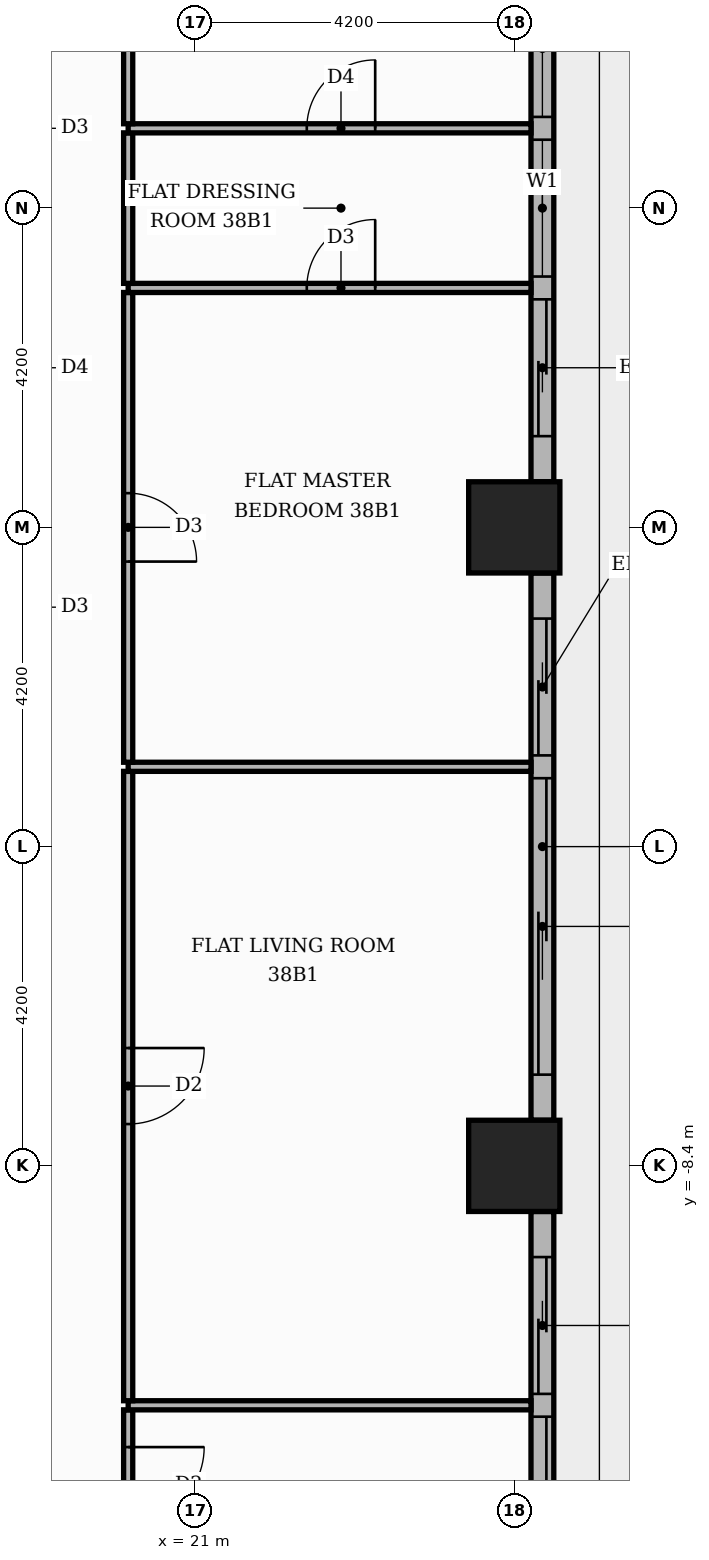
"""IFC4 building model, lengths in metres.
Left out: names, types, materials, properties, quantities, classifications, styles, units other than length and angle.
Written with IfcOpenShell. Run it as: python <this file> out.ifc"""

import sys

from ifc_helpers import new_model, si_unit, direction, frame, frame_2d, origin, origin_2d, place, context, subcontext, project, spatial, rectangle, extrude, element, fill, save


model = new_model("IFC4")
c1 = context("Model", 3, precision=1e-05, world=origin(), true_north=direction((0.0, 1.0)))
c2 = subcontext(c1, "Body", "Model", "MODEL_VIEW")
j1 = project(units=[si_unit("LENGTHUNIT", "METRE"), si_unit("PLANEANGLEUNIT", "RADIAN")], contexts=[c1])
p1 = place(None, origin())
s1 = spatial("IfcSite", under=j1, at=p1, CompositionType="ELEMENT")
p2 = place(p1, origin())
s2 = spatial("IfcBuilding", under=s1, at=p2, CompositionType="ELEMENT")
p3 = place(p2, frame((0.0, 0.0, 161.1)))
s3 = spatial("IfcBuildingStorey", under=s2, at=p3, CompositionType="ELEMENT", Elevation=161.1)
for number, where, z_axis, x_axis in (
    (1, (25.2, 0.0, 0.0), (0.0, 0.0, 1.0), (1.0, 0.0, 0.0)),
    (2, (25.2, -8.4, 0.0), (0.0, 0.0, 1.0), (1.0, 0.0, 0.0)),
):
    element("IfcColumn", number, at=place(p3, frame(where, z_axis=z_axis, x_axis=x_axis)), inside=s3, PredefinedType="COLUMN", context=c2, shape_type="SweptSolid", body=[
        extrude(rectangle(XDim=1.2, YDim=1.2, at=origin_2d()), origin(), (0.0, 0.0, 1.0), 3.9),
    ])
p4 = place(p3, frame((25.57, -16.2, 0.0), z_axis=(0.0, 0.0, 1.0), x_axis=(0.0, 1.0, 0.0)))
e3 = element("IfcWall", 3, at=p4, inside=s3, PredefinedType="STANDARD", context=c2, shape_type="SweptSolid", body=[
    extrude(rectangle(XDim=7.2, YDim=0.3, at=frame_2d((3.6, 0.0))), origin(), (0.0, 0.0, 1.0), 3.48),
])
p5 = place(p4, frame((0.6, 0.0, 0.0)))
e4 = element("IfcOpeningElement", 4, at=p5, cuts=e3, PredefinedType="OPENING", context=c2, shape_type="SweptSolid", body=[
    extrude(rectangle(XDim=3.9, YDim=2.4, at=frame_2d((1.95, 1.2))), frame((0.0, 0.16, 0.0), z_axis=(0.0, -1.0, 0.0), x_axis=(1.0, 0.0, 0.0)), (0.0, 0.0, 1.0), 0.32),
])
p6 = place(p4, frame((4.8, 0.0, 0.0)))
e5 = element("IfcOpeningElement", 5, at=p6, cuts=e3, PredefinedType="OPENING", context=c2, shape_type="SweptSolid", body=[
    extrude(rectangle(XDim=1.8, YDim=2.4, at=frame_2d((0.9, 1.2))), frame((0.0, 0.16, 0.0), z_axis=(0.0, -1.0, 0.0), x_axis=(1.0, 0.0, 0.0)), (0.0, 0.0, 1.0), 0.32),
])
p7 = place(p3, frame((25.57, -7.8, 0.0), z_axis=(0.0, 0.0, 1.0), x_axis=(0.0, 1.0, 0.0)))
e6 = element("IfcWall", 6, at=p7, inside=s3, PredefinedType="STANDARD", context=c2, shape_type="SweptSolid", body=[
    extrude(rectangle(XDim=7.2, YDim=0.3, at=frame_2d((3.6, 0.0))), origin(), (0.0, 0.0, 1.0), 3.48),
])
p8 = place(p7, frame((0.6, 0.0, 0.0)))
e7 = element("IfcOpeningElement", 7, at=p8, cuts=e6, PredefinedType="OPENING", context=c2, shape_type="SweptSolid", body=[
    extrude(rectangle(XDim=3.9, YDim=2.4, at=frame_2d((1.95, 1.2))), frame((0.0, 0.16, 0.0), z_axis=(0.0, -1.0, 0.0), x_axis=(1.0, 0.0, 0.0)), (0.0, 0.0, 1.0), 0.32),
])
p9 = place(p7, frame((4.8, 0.0, 0.0)))
e8 = element("IfcOpeningElement", 8, at=p9, cuts=e6, PredefinedType="OPENING", context=c2, shape_type="SweptSolid", body=[
    extrude(rectangle(XDim=1.8, YDim=2.4, at=frame_2d((0.9, 1.2))), frame((0.0, 0.16, 0.0), z_axis=(0.0, -1.0, 0.0), x_axis=(1.0, 0.0, 0.0)), (0.0, 0.0, 1.0), 0.32),
])
p10 = place(p3, frame((25.57, 0.6, 0.0), z_axis=(0.0, 0.0, 1.0), x_axis=(0.0, 1.0, 0.0)))
e9 = element("IfcWall", 9, at=p10, inside=s3, PredefinedType="STANDARD", context=c2, shape_type="SweptSolid", body=[
    extrude(rectangle(XDim=7.2, YDim=0.3, at=frame_2d((3.6, 0.0))), origin(), (0.0, 0.0, 1.0), 3.48),
])
p11 = place(p10, frame((0.6, 0.0, 0.0)))
e10 = element("IfcOpeningElement", 10, at=p11, cuts=e9, PredefinedType="OPENING", context=c2, shape_type="SweptSolid", body=[
    extrude(rectangle(XDim=1.8, YDim=2.4, at=frame_2d((0.9, 1.2))), frame((0.0, 0.16, 0.0), z_axis=(0.0, -1.0, 0.0), x_axis=(1.0, 0.0, 0.0)), (0.0, 0.0, 1.0), 0.32),
])
p12 = place(p10, frame((2.7, 0.0, 0.9)))
e11 = element("IfcOpeningElement", 11, at=p12, cuts=e9, PredefinedType="OPENING", context=c2, shape_type="SweptSolid", body=[
    extrude(rectangle(XDim=1.8, YDim=2.1, at=frame_2d((0.9, 1.05))), frame((0.0, 0.16, 0.0), z_axis=(0.0, -1.0, 0.0), x_axis=(1.0, 0.0, 0.0)), (0.0, 0.0, 1.0), 0.32),
])
p13 = place(p10, frame((4.8, 0.0, 0.9)))
e12 = element("IfcOpeningElement", 12, at=p13, cuts=e9, PredefinedType="OPENING", context=c2, shape_type="SweptSolid", body=[
    extrude(rectangle(XDim=1.8, YDim=2.1, at=frame_2d((0.9, 1.05))), frame((0.0, 0.16, 0.0), z_axis=(0.0, -1.0, 0.0), x_axis=(1.0, 0.0, 0.0)), (0.0, 0.0, 1.0), 0.32),
])
p14 = place(p3, frame((20.12, -13.59, 0.0), z_axis=(0.0, 0.0, 1.0), x_axis=(0.0, 1.0, 0.0)))
e13 = element("IfcWall", 13, at=p14, inside=s3, PredefinedType="PARTITIONING", context=c2, shape_type="SweptSolid", body=[
    extrude(rectangle(XDim=1.98, YDim=0.12, at=frame_2d((0.99, 0.0))), origin(), (0.0, 0.0, 1.0), 3.48),
])
p15 = place(p14, frame((0.49, 0.0, 0.0)))
e14 = element("IfcOpeningElement", 14, at=p15, cuts=e13, PredefinedType="OPENING", context=c2, shape_type="SweptSolid", body=[
    extrude(rectangle(XDim=1.0, YDim=2.1, at=frame_2d((0.5, 1.05))), frame((0.0, 0.07, 0.0), z_axis=(0.0, -1.0, 0.0), x_axis=(1.0, 0.0, 0.0)), (0.0, 0.0, 1.0), 0.14),
])
p16 = place(p3, frame((20.12, -11.55, 0.0), z_axis=(0.0, 0.0, 1.0), x_axis=(1.0, 0.0, 0.0)))
e15 = element("IfcWall", 15, at=p16, inside=s3, PredefinedType="PARTITIONING", context=c2, shape_type="SweptSolid", body=[
    extrude(rectangle(XDim=5.3, YDim=0.12, at=frame_2d((2.65, 0.0))), origin(), (0.0, 0.0, 1.0), 3.48),
])
p17 = place(p3, frame((20.12, -11.49, 0.0), z_axis=(0.0, 0.0, 1.0), x_axis=(0.0, 1.0, 0.0)))
e16 = element("IfcWall", 16, at=p17, inside=s3, PredefinedType="PARTITIONING", context=c2, shape_type="SweptSolid", body=[
    extrude(rectangle(XDim=8.28, YDim=0.12, at=frame_2d((4.14, 0.0))), origin(), (0.0, 0.0, 1.0), 3.48),
])
p18 = place(p17, frame((3.64, 0.0, 0.0)))
e17 = element("IfcOpeningElement", 17, at=p18, cuts=e16, PredefinedType="OPENING", context=c2, shape_type="SweptSolid", body=[
    extrude(rectangle(XDim=1.0, YDim=2.1, at=frame_2d((0.5, 1.05))), frame((0.0, 0.07, 0.0), z_axis=(0.0, -1.0, 0.0), x_axis=(1.0, 0.0, 0.0)), (0.0, 0.0, 1.0), 0.14),
])
p19 = place(p3, frame((20.12, -3.15, 0.0), z_axis=(0.0, 0.0, 1.0), x_axis=(1.0, 0.0, 0.0)))
e18 = element("IfcWall", 18, at=p19, inside=s3, PredefinedType="PARTITIONING", context=c2, shape_type="SweptSolid", body=[
    extrude(rectangle(XDim=5.3, YDim=0.12, at=frame_2d((2.65, 0.0))), origin(), (0.0, 0.0, 1.0), 3.48),
])
p20 = place(p3, frame((20.12, -3.09, 0.0), z_axis=(0.0, 0.0, 1.0), x_axis=(0.0, 1.0, 0.0)))
e19 = element("IfcWall", 19, at=p20, inside=s3, PredefinedType="PARTITIONING", context=c2, shape_type="SweptSolid", body=[
    extrude(rectangle(XDim=6.18, YDim=0.12, at=frame_2d((3.09, 0.0))), origin(), (0.0, 0.0, 1.0), 3.48),
])
p21 = place(p20, frame((2.64, 0.0, 0.0)))
e20 = element("IfcOpeningElement", 20, at=p21, cuts=e19, PredefinedType="OPENING", context=c2, shape_type="SweptSolid", body=[
    extrude(rectangle(XDim=0.9, YDim=2.1, at=frame_2d((0.45, 1.05))), frame((0.0, 0.07, 0.0), z_axis=(0.0, -1.0, 0.0), x_axis=(1.0, 0.0, 0.0)), (0.0, 0.0, 1.0), 0.14),
])
p22 = place(p3, frame((20.12, 3.15, 0.0), z_axis=(0.0, 0.0, 1.0), x_axis=(1.0, 0.0, 0.0)))
e21 = element("IfcWall", 21, at=p22, inside=s3, PredefinedType="PARTITIONING", context=c2, shape_type="SweptSolid", body=[
    extrude(rectangle(XDim=5.3, YDim=0.12, at=frame_2d((2.65, 0.0))), origin(), (0.0, 0.0, 1.0), 3.48),
])
p23 = place(p22, frame((2.35, 0.0, 0.0)))
e22 = element("IfcOpeningElement", 22, at=p23, cuts=e21, PredefinedType="OPENING", context=c2, shape_type="SweptSolid", body=[
    extrude(rectangle(XDim=0.9, YDim=2.1, at=frame_2d((0.45, 1.05))), frame((0.0, 0.07, 0.0), z_axis=(0.0, -1.0, 0.0), x_axis=(1.0, 0.0, 0.0)), (0.0, 0.0, 1.0), 0.14),
])
p24 = place(p3, frame((20.12, 3.21, 0.0), z_axis=(0.0, 0.0, 1.0), x_axis=(0.0, 1.0, 0.0)))
e23 = element("IfcWall", 23, at=p24, inside=s3, PredefinedType="PARTITIONING", context=c2, shape_type="SweptSolid", body=[
    extrude(rectangle(XDim=1.98, YDim=0.12, at=frame_2d((0.99, 0.0))), origin(), (0.0, 0.0, 1.0), 3.48),
])
p25 = place(p3, frame((20.12, 5.25, 0.0), z_axis=(0.0, 0.0, 1.0), x_axis=(1.0, 0.0, 0.0)))
e24 = element("IfcWall", 24, at=p25, inside=s3, PredefinedType="PARTITIONING", context=c2, shape_type="SweptSolid", body=[
    extrude(rectangle(XDim=5.3, YDim=0.12, at=frame_2d((2.65, 0.0))), origin(), (0.0, 0.0, 1.0), 3.48),
])
p26 = place(p25, frame((2.35, 0.0, 0.0)))
e25 = element("IfcOpeningElement", 25, at=p26, cuts=e24, PredefinedType="OPENING", context=c2, shape_type="SweptSolid", body=[
    extrude(rectangle(XDim=0.9, YDim=2.1, at=frame_2d((0.45, 1.05))), frame((0.0, 0.07, 0.0), z_axis=(0.0, -1.0, 0.0), x_axis=(1.0, 0.0, 0.0)), (0.0, 0.0, 1.0), 0.14),
])
p27 = place(p3, frame((20.12, 5.31, 0.0), z_axis=(0.0, 0.0, 1.0), x_axis=(0.0, 1.0, 0.0)))
e26 = element("IfcWall", 26, at=p27, inside=s3, PredefinedType="PARTITIONING", context=c2, shape_type="SweptSolid", body=[
    extrude(rectangle(XDim=1.98, YDim=0.12, at=frame_2d((0.99, 0.0))), origin(), (0.0, 0.0, 1.0), 3.48),
])
p28 = place(p5, origin())
e27 = element("IfcDoor", 27, at=p28, inside=s3, OperationType="SLIDING_TO_LEFT", PredefinedType="DOOR", context=c2, shape_type="SweptSolid", body=[
    extrude(rectangle(XDim=3.9, YDim=2.4, at=frame_2d((1.95, 1.2))), frame((0.0, 0.025, 0.0), z_axis=(0.0, -1.0, 0.0), x_axis=(1.0, 0.0, 0.0)), (0.0, 0.0, 1.0), 0.05),
])
fill(e4, e27)
p29 = place(p6, origin())
e28 = element("IfcDoor", 28, at=p29, inside=s3, OperationType="SLIDING_TO_RIGHT", PredefinedType="DOOR", context=c2, shape_type="SweptSolid", body=[
    extrude(rectangle(XDim=1.8, YDim=2.4, at=frame_2d((0.9, 1.2))), frame((0.0, 0.025, 0.0), z_axis=(0.0, -1.0, 0.0), x_axis=(1.0, 0.0, 0.0)), (0.0, 0.0, 1.0), 0.05),
])
fill(e5, e28)
p30 = place(p8, origin())
e29 = element("IfcDoor", 29, at=p30, inside=s3, OperationType="SLIDING_TO_LEFT", PredefinedType="DOOR", context=c2, shape_type="SweptSolid", body=[
    extrude(rectangle(XDim=3.9, YDim=2.4, at=frame_2d((1.95, 1.2))), frame((0.0, 0.025, 0.0), z_axis=(0.0, -1.0, 0.0), x_axis=(1.0, 0.0, 0.0)), (0.0, 0.0, 1.0), 0.05),
])
fill(e7, e29)
p31 = place(p9, origin())
e30 = element("IfcDoor", 30, at=p31, inside=s3, OperationType="SLIDING_TO_RIGHT", PredefinedType="DOOR", context=c2, shape_type="SweptSolid", body=[
    extrude(rectangle(XDim=1.8, YDim=2.4, at=frame_2d((0.9, 1.2))), frame((0.0, 0.025, 0.0), z_axis=(0.0, -1.0, 0.0), x_axis=(1.0, 0.0, 0.0)), (0.0, 0.0, 1.0), 0.05),
])
fill(e8, e30)
p32 = place(p11, origin())
e31 = element("IfcDoor", 31, at=p32, inside=s3, OperationType="SLIDING_TO_LEFT", PredefinedType="DOOR", context=c2, shape_type="SweptSolid", body=[
    extrude(rectangle(XDim=1.8, YDim=2.4, at=frame_2d((0.9, 1.2))), frame((0.0, 0.025, 0.0), z_axis=(0.0, -1.0, 0.0), x_axis=(1.0, 0.0, 0.0)), (0.0, 0.0, 1.0), 0.05),
])
fill(e10, e31)
p33 = place(p12, origin())
e32 = element("IfcWindow", 32, at=p33, inside=s3, PartitioningType="SINGLE_PANEL", PredefinedType="WINDOW", context=c2, shape_type="SweptSolid", body=[
    extrude(rectangle(XDim=1.8, YDim=2.1, at=frame_2d((0.9, 1.05))), frame((0.0, 0.03, 0.0), z_axis=(0.0, -1.0, 0.0), x_axis=(1.0, 0.0, 0.0)), (0.0, 0.0, 1.0), 0.06),
])
fill(e11, e32)
p34 = place(p13, origin())
e33 = element("IfcWindow", 33, at=p34, inside=s3, PartitioningType="SINGLE_PANEL", PredefinedType="WINDOW", context=c2, shape_type="SweptSolid", body=[
    extrude(rectangle(XDim=1.8, YDim=2.1, at=frame_2d((0.9, 1.05))), frame((0.0, 0.03, 0.0), z_axis=(0.0, -1.0, 0.0), x_axis=(1.0, 0.0, 0.0)), (0.0, 0.0, 1.0), 0.06),
])
fill(e12, e33)
p35 = place(p15, frame((1.0, 0.0, 0.0), z_axis=(0.0, 0.0, 1.0), x_axis=(-1.0, 0.0, 0.0)))
e34 = element("IfcDoor", 34, at=p35, inside=s3, OperationType="SINGLE_SWING_RIGHT", PredefinedType="DOOR", context=c2, shape_type="SweptSolid", body=[
    extrude(rectangle(XDim=1.0, YDim=2.1, at=frame_2d((0.5, 1.05))), frame((0.0, 0.025, 0.0), z_axis=(0.0, -1.0, 0.0), x_axis=(1.0, 0.0, 0.0)), (0.0, 0.0, 1.0), 0.05),
])
fill(e14, e34)
p36 = place(p18, frame((1.0, 0.0, 0.0), z_axis=(0.0, 0.0, 1.0), x_axis=(-1.0, 0.0, 0.0)))
e35 = element("IfcDoor", 35, at=p36, inside=s3, OperationType="SINGLE_SWING_RIGHT", PredefinedType="DOOR", context=c2, shape_type="SweptSolid", body=[
    extrude(rectangle(XDim=1.0, YDim=2.1, at=frame_2d((0.5, 1.05))), frame((0.0, 0.025, 0.0), z_axis=(0.0, -1.0, 0.0), x_axis=(1.0, 0.0, 0.0)), (0.0, 0.0, 1.0), 0.05),
])
fill(e17, e35)
p37 = place(p21, frame((0.9, 0.0, 0.0), z_axis=(0.0, 0.0, 1.0), x_axis=(-1.0, 0.0, 0.0)))
e36 = element("IfcDoor", 36, at=p37, inside=s3, OperationType="SINGLE_SWING_LEFT", PredefinedType="DOOR", context=c2, shape_type="SweptSolid", body=[
    extrude(rectangle(XDim=0.9, YDim=2.1, at=frame_2d((0.45, 1.05))), frame((0.0, 0.025, 0.0), z_axis=(0.0, -1.0, 0.0), x_axis=(1.0, 0.0, 0.0)), (0.0, 0.0, 1.0), 0.05),
])
fill(e20, e36)
p38 = place(p23, origin())
e37 = element("IfcDoor", 37, at=p38, inside=s3, OperationType="SINGLE_SWING_RIGHT", PredefinedType="DOOR", context=c2, shape_type="SweptSolid", body=[
    extrude(rectangle(XDim=0.9, YDim=2.1, at=frame_2d((0.45, 1.05))), frame((0.0, 0.025, 0.0), z_axis=(0.0, -1.0, 0.0), x_axis=(1.0, 0.0, 0.0)), (0.0, 0.0, 1.0), 0.05),
])
fill(e22, e37)
p39 = place(p26, origin())
e38 = element("IfcDoor", 38, at=p39, inside=s3, OperationType="SINGLE_SWING_RIGHT", PredefinedType="DOOR", context=c2, shape_type="SweptSolid", body=[
    extrude(rectangle(XDim=0.9, YDim=2.1, at=frame_2d((0.45, 1.05))), frame((0.0, 0.025, 0.0), z_axis=(0.0, -1.0, 0.0), x_axis=(1.0, 0.0, 0.0)), (0.0, 0.0, 1.0), 0.05),
])
fill(e25, e38)
save(model, sys.argv[1])
